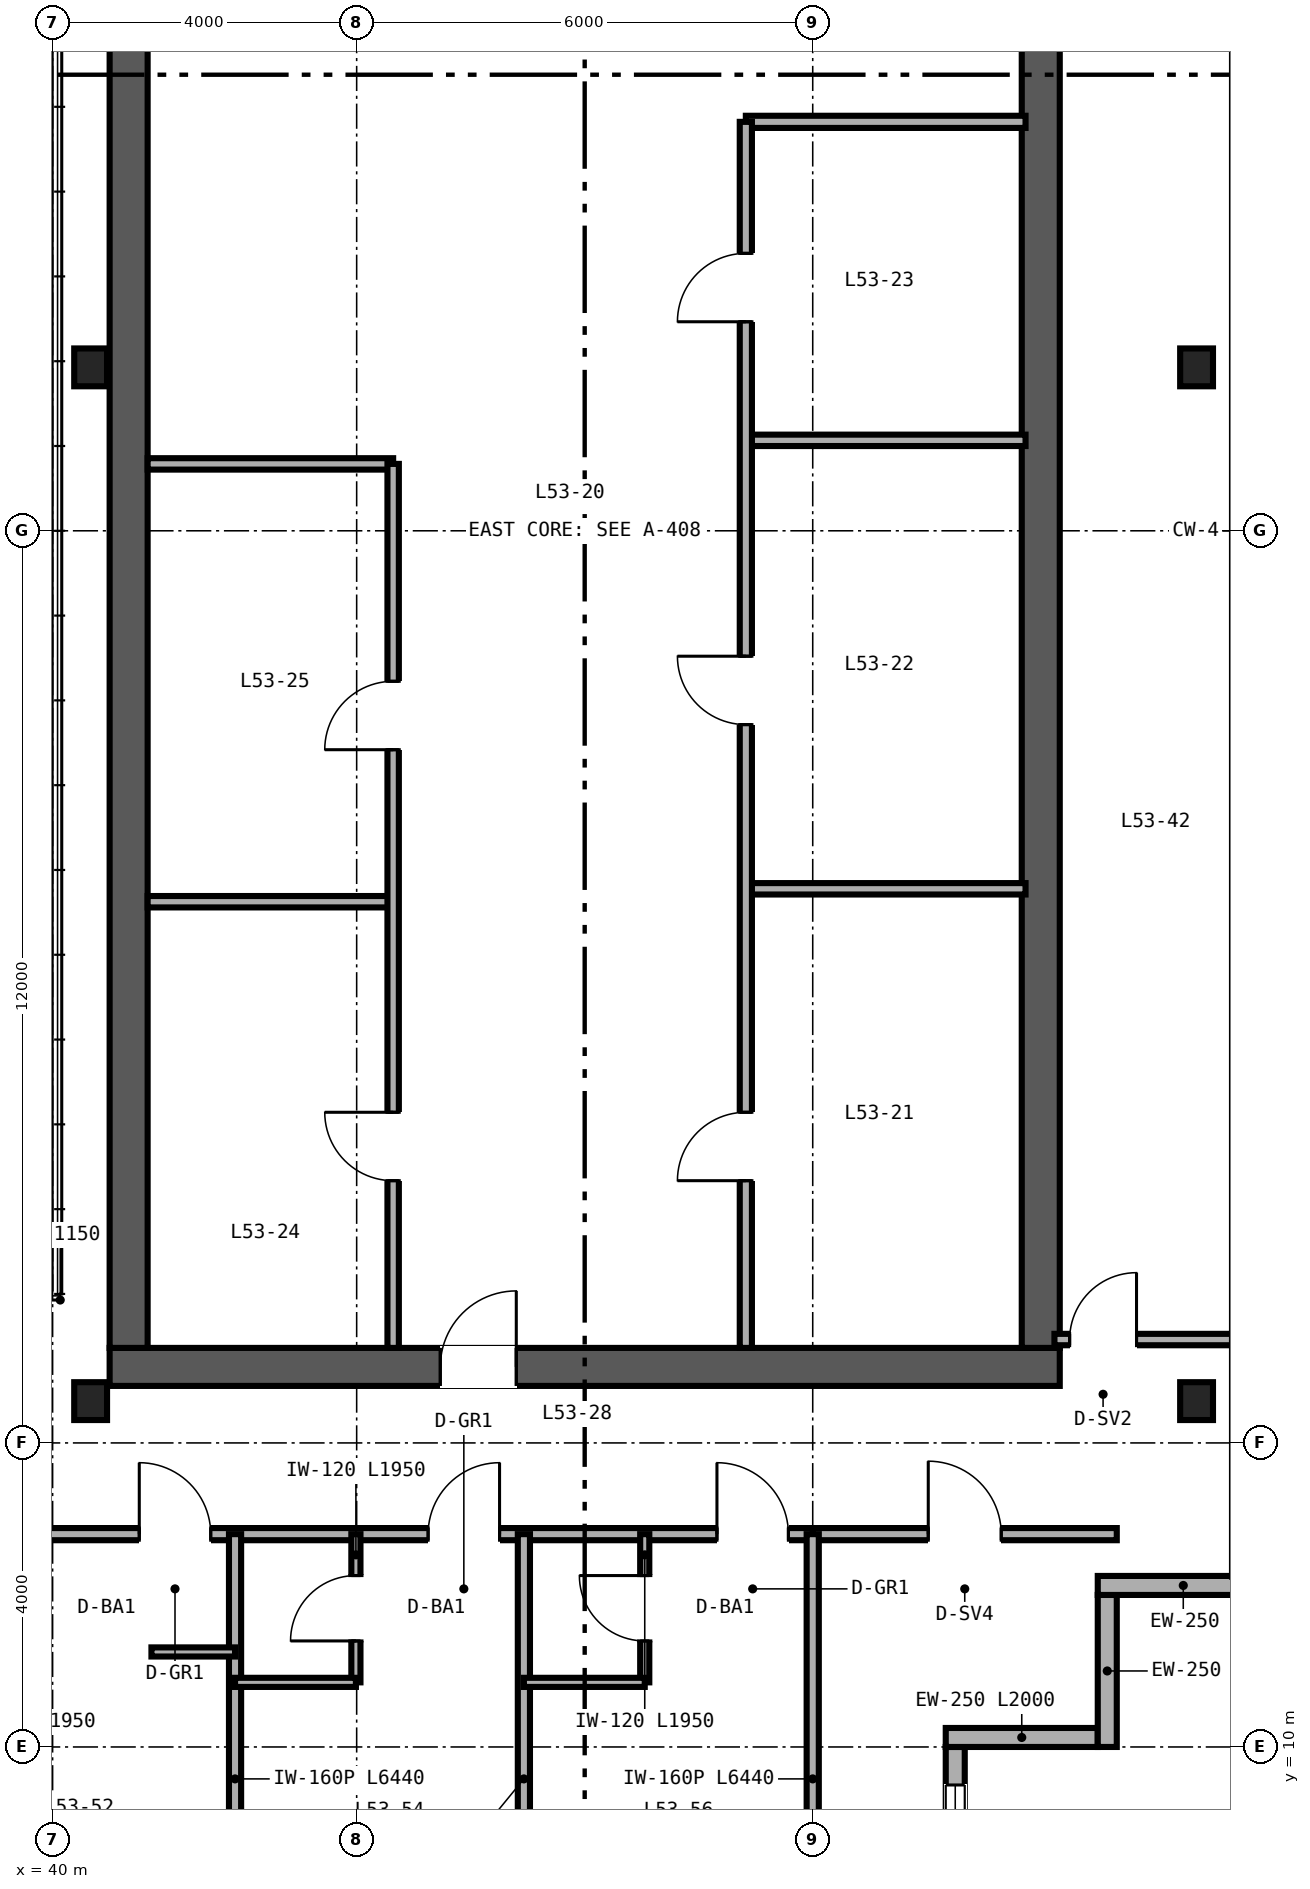
"""IFC4 building model, lengths in metres.
Left out: names, types, materials, properties, quantities, classifications, styles, units other than length and angle.
Written with IfcOpenShell. Run it as: python <this file> out.ifc"""

import sys

from ifc_helpers import new_model, si_unit, direction, frame, frame_2d, origin, origin_2d, place, context, subcontext, project, spatial, rectangle, i_section, extrude, source, transform, mapped, element, fill, save


model = new_model("IFC4")
c1 = context("Model", 3, precision=1e-05, world=origin(), true_north=direction((0.0, 1.0)))
c2 = subcontext(c1, "Body", "Model", "MODEL_VIEW")
j1 = project(units=[si_unit("LENGTHUNIT", "METRE"), si_unit("PLANEANGLEUNIT", "RADIAN")], contexts=[c1])
p1 = place(None, origin())
s1 = spatial("IfcSite", under=j1, at=p1, CompositionType="ELEMENT")
p2 = place(p1, origin())
s2 = spatial("IfcBuilding", under=s1, at=p2, CompositionType="ELEMENT")
p3 = place(p2, frame((0.0, 0.0, 210.0)))
s3 = spatial("IfcBuildingStorey", under=s2, at=p3, CompositionType="ELEMENT", Elevation=210.0)
p4 = place(p3, frame((40.75, 15.0, 0.0), z_axis=(0.0, 0.0, 1.0), x_axis=(1.0, 0.0, 0.0)))
e1 = element("IfcWall", 1, at=p4, inside=s3, PredefinedType="SHEAR", context=c2, shape_type="SweptSolid", body=[
    extrude(rectangle(XDim=12.5, YDim=0.5, at=frame_2d((6.25, 0.0))), origin(), (0.0, 0.0, 1.0), 3.37),
])
p5 = place(p4, frame((4.35, 0.0, 0.0)))
e2 = element("IfcOpeningElement", 2, at=p5, cuts=e1, PredefinedType="OPENING", context=c2, shape_type="SweptSolid", body=[
    extrude(rectangle(XDim=1.0, YDim=2.15, at=frame_2d((0.5, 1.075))), frame((0.0, 0.26, 0.0), z_axis=(0.0, -1.0, 0.0), x_axis=(1.0, 0.0, 0.0)), (0.0, 0.0, 1.0), 0.52),
])
for number, where, z_axis, x_axis in (
    (3, (41.0, 15.25, 0.0), (0.0, 0.0, 1.0), (0.0, 1.0, 0.0)),
    (4, (53.0, 15.25, 0.0), (0.0, 0.0, 1.0), (0.0, 1.0, 0.0)),
):
    element("IfcWall", number, at=place(p3, frame(where, z_axis=z_axis, x_axis=x_axis)), inside=s3, PredefinedType="SHEAR", context=c2, shape_type="SweptSolid", body=[
        extrude(rectangle(XDim=21.5, YDim=0.5, at=frame_2d((10.75, 0.0))), origin(), (0.0, 0.0, 1.0), 3.37),
    ])
m1 = source(origin(), c2, "Body", "SweptSolid", [
    extrude(i_section(OverallWidth=0.432, OverallDepth=0.498, WebThickness=0.056, FlangeThickness=0.089, FilletRadius=0.025, at=origin_2d()), origin(), (0.0, 0.0, 1.0), 3.37),
])
for number, where, z_axis, x_axis in (
    (5, (40.5, 14.55, 0.0), (0.0, 0.0, 1.0), (1.0, 0.0, 0.0)),
    (6, (55.05, 14.55, 0.0), (0.0, 0.0, 1.0), (1.0, 0.0, 0.0)),
    (7, (40.5, 28.15, 0.0), (0.0, 0.0, 1.0), (1.0, 0.0, 0.0)),
    (8, (55.05, 28.15, 0.0), (0.0, 0.0, 1.0), (1.0, 0.0, 0.0)),
):
    element("IfcColumn", number, at=place(p3, frame(where, z_axis=z_axis, x_axis=x_axis)), inside=s3, PredefinedType="COLUMN", context=c2, shape_type="MappedRepresentation", body=[
        mapped(m1, transform((0.0, 0.0, 0.0), scale=1.0)),
    ])
p6 = place(p3, frame((51.875, 8.0, 0.0), z_axis=(0.0, 0.0, 1.0), x_axis=(0.0, 1.0, 0.0)))
e9 = element("IfcWall", 9, at=p6, inside=s3, PredefinedType="SOLIDWALL", context=c2, shape_type="SweptSolid", body=[
    extrude(rectangle(XDim=2.0, YDim=0.25, at=frame_2d((1.0, 0.0))), origin(), (0.0, 0.0, 1.0), 3.37),
])
p7 = place(p6, frame((0.5, 0.0, 0.85)))
e10 = element("IfcOpeningElement", 10, at=p7, cuts=e9, PredefinedType="OPENING", context=c2, shape_type="SweptSolid", body=[
    extrude(rectangle(XDim=1.0, YDim=1.9, at=frame_2d((0.5, 0.95))), frame((0.0, 0.135, 0.0), z_axis=(0.0, -1.0, 0.0), x_axis=(1.0, 0.0, 0.0)), (0.0, 0.0, 1.0), 0.27),
])
for number, where, z_axis, x_axis in (
    (11, (51.75, 10.125, 0.0), (0.0, 0.0, 1.0), (1.0, 0.0, 0.0)),
    (12, (53.875, 10.0, 0.0), (0.0, 0.0, 1.0), (0.0, 1.0, 0.0)),
):
    element("IfcWall", number, at=place(p3, frame(where, z_axis=z_axis, x_axis=x_axis)), inside=s3, PredefinedType="SOLIDWALL", context=c2, shape_type="SweptSolid", body=[
        extrude(rectangle(XDim=2.0, YDim=0.25, at=frame_2d((1.0, 0.0))), origin(), (0.0, 0.0, 1.0), 3.37),
    ])
p8 = place(p3, frame((53.75, 12.125, 0.0), z_axis=(0.0, 0.0, 1.0), x_axis=(1.0, 0.0, 0.0)))
e13 = element("IfcWall", 13, at=p8, inside=s3, PredefinedType="SOLIDWALL", context=c2, shape_type="SweptSolid", body=[
    extrude(rectangle(XDim=2.25, YDim=0.25, at=frame_2d((1.125, 0.0))), origin(), (0.0, 0.0, 1.0), 3.37),
])
p9 = place(p3, frame((49.12, 31.38, 0.0), z_axis=(0.0, 0.0, 1.0), x_axis=(1.0, 0.0, 0.0)))
e14 = element("IfcWall", 14, at=p9, inside=s3, PredefinedType="PARTITIONING", context=c2, shape_type="SweptSolid", body=[
    extrude(rectangle(XDim=3.68, YDim=0.16, at=frame_2d((1.84, 0.0))), origin(), (0.0, 0.0, 1.0), 2.47),
])
for number, where, z_axis, x_axis in (
    (15, (49.12, 21.29, 0.0), (0.0, 0.0, 1.0), (1.0, 0.0, 0.0)),
    (16, (49.12, 27.19, 0.0), (0.0, 0.0, 1.0), (1.0, 0.0, 0.0)),
):
    element("IfcWall", number, at=place(p3, frame(where, z_axis=z_axis, x_axis=x_axis)), inside=s3, PredefinedType="PARTITIONING", context=c2, shape_type="SweptSolid", body=[
        extrude(rectangle(XDim=3.68, YDim=0.15, at=frame_2d((1.84, 0.0))), origin(), (0.0, 0.0, 1.0), 3.37),
    ])
p10 = place(p3, frame((49.12, 15.25, 0.0), z_axis=(0.0, 0.0, 1.0), x_axis=(0.0, 1.0, 0.0)))
e17 = element("IfcWall", 17, at=p10, inside=s3, PredefinedType="PARTITIONING", context=c2, shape_type="SweptSolid", body=[
    extrude(rectangle(XDim=16.13, YDim=0.16, at=frame_2d((8.065, 0.0))), origin(), (0.0, 0.0, 1.0), 2.443),
])
p11 = place(p10, frame((2.2, 0.0, 0.0)))
e18 = element("IfcOpeningElement", 18, at=p11, cuts=e17, PredefinedType="OPENING", context=c2, shape_type="SweptSolid", body=[
    extrude(rectangle(XDim=0.9, YDim=2.15, at=frame_2d((0.45, 1.075))), frame((0.0, 0.09, 0.0), z_axis=(0.0, -1.0, 0.0), x_axis=(1.0, 0.0, 0.0)), (0.0, 0.0, 1.0), 0.18),
])
p12 = place(p10, frame((8.2, 0.0, 0.0)))
e19 = element("IfcOpeningElement", 19, at=p12, cuts=e17, PredefinedType="OPENING", context=c2, shape_type="SweptSolid", body=[
    extrude(rectangle(XDim=0.9, YDim=2.15, at=frame_2d((0.45, 1.075))), frame((0.0, 0.09, 0.0), z_axis=(0.0, -1.0, 0.0), x_axis=(1.0, 0.0, 0.0)), (0.0, 0.0, 1.0), 0.18),
])
p13 = place(p10, frame((13.5, 0.0, 0.0)))
e20 = element("IfcOpeningElement", 20, at=p13, cuts=e17, PredefinedType="OPENING", context=c2, shape_type="SweptSolid", body=[
    extrude(rectangle(XDim=0.9, YDim=2.15, at=frame_2d((0.45, 1.075))), frame((0.0, 0.09, 0.0), z_axis=(0.0, -1.0, 0.0), x_axis=(1.0, 0.0, 0.0)), (0.0, 0.0, 1.0), 0.18),
])
for number, where, z_axis, x_axis in (
    (21, (41.25, 26.88, 0.0), (0.0, 0.0, 1.0), (1.0, 0.0, 0.0)),
    (22, (41.25, 21.12, 0.0), (0.0, 0.0, 1.0), (1.0, 0.0, 0.0)),
):
    element("IfcWall", number, at=place(p3, frame(where, z_axis=z_axis, x_axis=x_axis)), inside=s3, PredefinedType="PARTITIONING", context=c2, shape_type="SweptSolid", body=[
        extrude(rectangle(XDim=3.23, YDim=0.15, at=frame_2d((1.615, 0.0))), origin(), (0.0, 0.0, 1.0), 3.37),
    ])
p14 = place(p3, frame((44.48, 15.25, 0.0), z_axis=(0.0, 0.0, 1.0), x_axis=(0.0, 1.0, 0.0)))
e23 = element("IfcWall", 23, at=p14, inside=s3, PredefinedType="PARTITIONING", context=c2, shape_type="SweptSolid", body=[
    extrude(rectangle(XDim=11.63, YDim=0.15, at=frame_2d((5.815, 0.0))), origin(), (0.0, 0.0, 1.0), 3.37),
])
p15 = place(p14, frame((2.2, 0.0, 0.0)))
e24 = element("IfcOpeningElement", 24, at=p15, cuts=e23, PredefinedType="OPENING", context=c2, shape_type="SweptSolid", body=[
    extrude(rectangle(XDim=0.9, YDim=2.15, at=frame_2d((0.45, 1.075))), frame((0.0, 0.085, 0.0), z_axis=(0.0, -1.0, 0.0), x_axis=(1.0, 0.0, 0.0)), (0.0, 0.0, 1.0), 0.17),
])
p16 = place(p14, frame((7.87, 0.0, 0.0)))
e25 = element("IfcOpeningElement", 25, at=p16, cuts=e23, PredefinedType="OPENING", context=c2, shape_type="SweptSolid", body=[
    extrude(rectangle(XDim=0.9, YDim=2.15, at=frame_2d((0.45, 1.075))), frame((0.0, 0.085, 0.0), z_axis=(0.0, -1.0, 0.0), x_axis=(1.0, 0.0, 0.0)), (0.0, 0.0, 1.0), 0.17),
])
p17 = place(p3, frame((53.18, 15.36, 0.0), z_axis=(0.0, 0.0, 1.0), x_axis=(1.0, 0.0, 0.0)))
e26 = element("IfcWall", 26, at=p17, inside=s3, PredefinedType="PARTITIONING", context=c2, shape_type="SweptSolid", body=[
    extrude(rectangle(XDim=2.66, YDim=0.15, at=frame_2d((1.33, 0.0))), origin(), (0.0, 0.0, 1.0), 2.591),
])
p18 = place(p17, frame((0.2, 0.0, 0.0)))
e27 = element("IfcOpeningElement", 27, at=p18, cuts=e26, PredefinedType="OPENING", context=c2, shape_type="SweptSolid", body=[
    extrude(rectangle(XDim=0.88, YDim=2.15, at=frame_2d((0.44, 1.075))), frame((0.0, 0.085, 0.0), z_axis=(0.0, -1.0, 0.0), x_axis=(1.0, 0.0, 0.0)), (0.0, 0.0, 1.0), 0.17),
])
p19 = place(p3, frame((50.0, 12.8, 0.0), z_axis=(0.0, 0.0, 1.0), x_axis=(1.0, 0.0, 0.0)))
e28 = element("IfcWall", 28, at=p19, inside=s3, PredefinedType="PARTITIONING", context=c2, shape_type="SweptSolid", body=[
    extrude(rectangle(XDim=4.0, YDim=0.16, at=frame_2d((2.0, 0.0))), origin(), (0.0, 0.0, 1.0), 3.37),
])
p20 = place(p19, frame((1.52, 0.0, 0.0)))
e29 = element("IfcOpeningElement", 29, at=p20, cuts=e28, PredefinedType="OPENING", context=c2, shape_type="SweptSolid", body=[
    extrude(rectangle(XDim=0.96, YDim=2.15, at=frame_2d((0.48, 1.075))), frame((0.0, 0.09, 0.0), z_axis=(0.0, -1.0, 0.0), x_axis=(1.0, 0.0, 0.0)), (0.0, 0.0, 1.0), 0.18),
])
p21 = place(p3, frame((38.0, 12.8, 0.0), z_axis=(0.0, 0.0, 1.0), x_axis=(1.0, 0.0, 0.0)))
e30 = element("IfcWall", 30, at=p21, inside=s3, PredefinedType="PARTITIONING", context=c2, shape_type="SweptSolid", body=[
    extrude(rectangle(XDim=12.0, YDim=0.16, at=frame_2d((6.0, 0.0))), origin(), (0.0, 0.0, 1.0), 2.913),
])
p22 = place(p21, frame((3.14, 0.0, 0.0)))
e31 = element("IfcOpeningElement", 31, at=p22, cuts=e30, PredefinedType="OPENING", context=c2, shape_type="SweptSolid", body=[
    extrude(rectangle(XDim=0.94, YDim=2.15, at=frame_2d((0.47, 1.075))), frame((0.0, 0.09, 0.0), z_axis=(0.0, -1.0, 0.0), x_axis=(1.0, 0.0, 0.0)), (0.0, 0.0, 1.0), 0.18),
])
p23 = place(p21, frame((6.94, 0.0, 0.0)))
e32 = element("IfcOpeningElement", 32, at=p23, cuts=e30, PredefinedType="OPENING", context=c2, shape_type="SweptSolid", body=[
    extrude(rectangle(XDim=0.94, YDim=2.15, at=frame_2d((0.47, 1.075))), frame((0.0, 0.09, 0.0), z_axis=(0.0, -1.0, 0.0), x_axis=(1.0, 0.0, 0.0)), (0.0, 0.0, 1.0), 0.18),
])
p24 = place(p21, frame((10.74, 0.0, 0.0)))
e33 = element("IfcOpeningElement", 33, at=p24, cuts=e30, PredefinedType="OPENING", context=c2, shape_type="SweptSolid", body=[
    extrude(rectangle(XDim=0.94, YDim=2.15, at=frame_2d((0.47, 1.075))), frame((0.0, 0.09, 0.0), z_axis=(0.0, -1.0, 0.0), x_axis=(1.0, 0.0, 0.0)), (0.0, 0.0, 1.0), 0.18),
])
p25 = place(p3, frame((50.0, 6.36, 0.0), z_axis=(0.0, 0.0, 1.0), x_axis=(0.0, 1.0, 0.0)))
e34 = element("IfcWall", 34, at=p25, inside=s3, PredefinedType="PARTITIONING", context=c2, shape_type="SweptSolid", body=[
    extrude(rectangle(XDim=6.44, YDim=0.16, at=frame_2d((3.22, 0.0))), origin(), (0.0, 0.0, 1.0), 2.677),
])
p26 = place(p3, frame((42.4, 6.36, 0.0), z_axis=(0.0, 0.0, 1.0), x_axis=(0.0, 1.0, 0.0)))
e35 = element("IfcWall", 35, at=p26, inside=s3, PredefinedType="PARTITIONING", context=c2, shape_type="SweptSolid", body=[
    extrude(rectangle(XDim=6.44, YDim=0.16, at=frame_2d((3.22, 0.0))), origin(), (0.0, 0.0, 1.0), 2.833),
])
p27 = place(p3, frame((41.3, 11.25, 0.0), z_axis=(0.0, 0.0, 1.0), x_axis=(1.0, 0.0, 0.0)))
e36 = element("IfcWall", 36, at=p27, inside=s3, PredefinedType="PARTITIONING", context=c2, shape_type="SweptSolid", body=[
    extrude(rectangle(XDim=1.1, YDim=0.12, at=frame_2d((0.55, 0.0))), origin(), (0.0, 0.0, 1.0), 3.37),
])
p28 = place(p3, frame((46.2, 6.36, 0.0), z_axis=(0.0, 0.0, 1.0), x_axis=(0.0, 1.0, 0.0)))
e37 = element("IfcWall", 37, at=p28, inside=s3, PredefinedType="PARTITIONING", context=c2, shape_type="SweptSolid", body=[
    extrude(rectangle(XDim=6.44, YDim=0.16, at=frame_2d((3.22, 0.0))), origin(), (0.0, 0.0, 1.0), 2.677),
])
p29 = place(p3, frame((43.99, 10.85, 0.0), z_axis=(0.0, 0.0, 1.0), x_axis=(0.0, 1.0, 0.0)))
e38 = element("IfcWall", 38, at=p29, inside=s3, PredefinedType="PARTITIONING", context=c2, shape_type="SweptSolid", body=[
    extrude(rectangle(XDim=1.95, YDim=0.12, at=frame_2d((0.975, 0.0))), origin(), (0.0, 0.0, 1.0), 3.37),
])
p30 = place(p29, frame((0.545, 0.0, 0.0)))
e39 = element("IfcOpeningElement", 39, at=p30, cuts=e38, PredefinedType="OPENING", context=c2, shape_type="SweptSolid", body=[
    extrude(rectangle(XDim=0.86, YDim=2.1, at=frame_2d((0.43, 1.05))), frame((0.0, 0.07, 0.0), z_axis=(0.0, -1.0, 0.0), x_axis=(1.0, 0.0, 0.0)), (0.0, 0.0, 1.0), 0.14),
])
p31 = place(p3, frame((42.4, 10.85, 0.0), z_axis=(0.0, 0.0, 1.0), x_axis=(1.0, 0.0, 0.0)))
e40 = element("IfcWall", 40, at=p31, inside=s3, PredefinedType="PARTITIONING", context=c2, shape_type="SweptSolid", body=[
    extrude(rectangle(XDim=1.59, YDim=0.12, at=frame_2d((0.795, 0.0))), origin(), (0.0, 0.0, 1.0), 3.37),
])
p32 = place(p3, frame((47.79, 10.85, 0.0), z_axis=(0.0, 0.0, 1.0), x_axis=(0.0, 1.0, 0.0)))
e41 = element("IfcWall", 41, at=p32, inside=s3, PredefinedType="PARTITIONING", context=c2, shape_type="SweptSolid", body=[
    extrude(rectangle(XDim=1.95, YDim=0.12, at=frame_2d((0.975, 0.0))), origin(), (0.0, 0.0, 1.0), 3.37),
])
p33 = place(p32, frame((0.545, 0.0, 0.0)))
e42 = element("IfcOpeningElement", 42, at=p33, cuts=e41, PredefinedType="OPENING", context=c2, shape_type="SweptSolid", body=[
    extrude(rectangle(XDim=0.86, YDim=2.1, at=frame_2d((0.43, 1.05))), frame((0.0, 0.07, 0.0), z_axis=(0.0, -1.0, 0.0), x_axis=(1.0, 0.0, 0.0)), (0.0, 0.0, 1.0), 0.14),
])
p34 = place(p3, frame((46.2, 10.85, 0.0), z_axis=(0.0, 0.0, 1.0), x_axis=(1.0, 0.0, 0.0)))
e43 = element("IfcWall", 43, at=p34, inside=s3, PredefinedType="PARTITIONING", context=c2, shape_type="SweptSolid", body=[
    extrude(rectangle(XDim=1.59, YDim=0.12, at=frame_2d((0.795, 0.0))), origin(), (0.0, 0.0, 1.0), 3.37),
])
m2 = source(origin(), c2, "Body", "SweptSolid", [
    extrude(rectangle(XDim=1.0, YDim=1.9, at=frame_2d((0.5, 0.95))), frame((0.0, 0.03, 0.0), z_axis=(0.0, -1.0, 0.0), x_axis=(1.0, 0.0, 0.0)), (0.0, 0.0, 1.0), 0.06),
])
p35 = place(p7, origin())
e44 = element("IfcWindow", 44, at=p35, inside=s3, PartitioningType="SINGLE_PANEL", PredefinedType="WINDOW", context=c2, shape_type="MappedRepresentation", body=[
    mapped(m2, transform((0.0, 0.0, 0.0), scale=1.0)),
])
fill(e10, e44)
m3 = source(origin(), c2, "Body", "SweptSolid", [
    extrude(rectangle(XDim=1.0, YDim=2.15, at=frame_2d((0.5, 1.075))), frame((0.0, 0.025, 0.0), z_axis=(0.0, -1.0, 0.0), x_axis=(1.0, 0.0, 0.0)), (0.0, 0.0, 1.0), 0.05),
])
p36 = place(p5, origin())
e45 = element("IfcDoor", 45, at=p36, inside=s3, OperationType="SINGLE_SWING_RIGHT", PredefinedType="DOOR", context=c2, shape_type="MappedRepresentation", body=[
    mapped(m3, transform((0.0, 0.0, 0.0), scale=1.0)),
])
fill(e2, e45)
m4 = source(origin(), c2, "Body", "SweptSolid", [
    extrude(rectangle(XDim=0.9, YDim=2.15, at=frame_2d((0.45, 1.075))), frame((0.0, 0.025, 0.0), z_axis=(0.0, -1.0, 0.0), x_axis=(1.0, 0.0, 0.0)), (0.0, 0.0, 1.0), 0.05),
])
p37 = place(p11, origin())
e46 = element("IfcDoor", 46, at=p37, inside=s3, OperationType="SINGLE_SWING_LEFT", PredefinedType="DOOR", context=c2, shape_type="MappedRepresentation", body=[
    mapped(m4, transform((0.0, 0.0, 0.0), scale=1.0)),
])
fill(e18, e46)
p38 = place(p12, origin())
e47 = element("IfcDoor", 47, at=p38, inside=s3, OperationType="SINGLE_SWING_RIGHT", PredefinedType="DOOR", context=c2, shape_type="MappedRepresentation", body=[
    mapped(m4, transform((0.0, 0.0, 0.0), scale=1.0)),
])
fill(e19, e47)
p39 = place(p13, origin())
e48 = element("IfcDoor", 48, at=p39, inside=s3, OperationType="SINGLE_SWING_LEFT", PredefinedType="DOOR", context=c2, shape_type="MappedRepresentation", body=[
    mapped(m4, transform((0.0, 0.0, 0.0), scale=1.0)),
])
fill(e20, e48)
p40 = place(p15, origin())
e49 = element("IfcDoor", 49, at=p40, inside=s3, OperationType="SINGLE_SWING_RIGHT", PredefinedType="DOOR", context=c2, shape_type="MappedRepresentation", body=[
    mapped(m4, transform((0.0, 0.0, 0.0), scale=1.0)),
])
fill(e24, e49)
p41 = place(p16, origin())
e50 = element("IfcDoor", 50, at=p41, inside=s3, OperationType="SINGLE_SWING_LEFT", PredefinedType="DOOR", context=c2, shape_type="MappedRepresentation", body=[
    mapped(m4, transform((0.0, 0.0, 0.0), scale=1.0)),
])
fill(e25, e50)
m5 = source(origin(), c2, "Body", "SweptSolid", [
    extrude(rectangle(XDim=0.88, YDim=2.15, at=frame_2d((0.44, 1.075))), frame((0.0, 0.025, 0.0), z_axis=(0.0, -1.0, 0.0), x_axis=(1.0, 0.0, 0.0)), (0.0, 0.0, 1.0), 0.05),
])
p42 = place(p18, origin())
e51 = element("IfcDoor", 51, at=p42, inside=s3, OperationType="SINGLE_SWING_RIGHT", PredefinedType="DOOR", context=c2, shape_type="MappedRepresentation", body=[
    mapped(m5, transform((0.0, 0.0, 0.0), scale=1.0)),
])
fill(e27, e51)
m6 = source(origin(), c2, "Body", "SweptSolid", [
    extrude(rectangle(XDim=0.96, YDim=2.15, at=frame_2d((0.48, 1.075))), frame((0.0, 0.025, 0.0), z_axis=(0.0, -1.0, 0.0), x_axis=(1.0, 0.0, 0.0)), (0.0, 0.0, 1.0), 0.05),
])
p43 = place(p20, origin())
e52 = element("IfcDoor", 52, at=p43, inside=s3, OperationType="SINGLE_SWING_LEFT", PredefinedType="DOOR", context=c2, shape_type="MappedRepresentation", body=[
    mapped(m6, transform((0.0, 0.0, 0.0), scale=1.0)),
])
fill(e29, e52)
m7 = source(origin(), c2, "Body", "SweptSolid", [
    extrude(rectangle(XDim=0.86, YDim=2.1, at=frame_2d((0.43, 1.05))), frame((0.0, 0.025, 0.0), z_axis=(0.0, -1.0, 0.0), x_axis=(1.0, 0.0, 0.0)), (0.0, 0.0, 1.0), 0.05),
])
p44 = place(p30, origin())
e53 = element("IfcDoor", 53, at=p44, inside=s3, OperationType="SINGLE_SWING_LEFT", PredefinedType="DOOR", context=c2, shape_type="MappedRepresentation", body=[
    mapped(m7, transform((0.0, 0.0, 0.0), scale=1.0)),
])
fill(e39, e53)
p45 = place(p33, origin())
e54 = element("IfcDoor", 54, at=p45, inside=s3, OperationType="SINGLE_SWING_RIGHT", PredefinedType="DOOR", context=c2, shape_type="MappedRepresentation", body=[
    mapped(m7, transform((0.0, 0.0, 0.0), scale=1.0)),
])
fill(e42, e54)
m8 = source(origin(), c2, "Body", "SweptSolid", [
    extrude(rectangle(XDim=0.94, YDim=2.15, at=frame_2d((0.47, 1.075))), frame((0.0, 0.025, 0.0), z_axis=(0.0, -1.0, 0.0), x_axis=(1.0, 0.0, 0.0)), (0.0, 0.0, 1.0), 0.05),
])
p46 = place(p22, origin())
e55 = element("IfcDoor", 55, at=p46, inside=s3, OperationType="SINGLE_SWING_LEFT", PredefinedType="DOOR", context=c2, shape_type="MappedRepresentation", body=[
    mapped(m8, transform((0.0, 0.0, 0.0), scale=1.0)),
])
fill(e31, e55)
p47 = place(p23, origin())
e56 = element("IfcDoor", 56, at=p47, inside=s3, OperationType="SINGLE_SWING_RIGHT", PredefinedType="DOOR", context=c2, shape_type="MappedRepresentation", body=[
    mapped(m8, transform((0.0, 0.0, 0.0), scale=1.0)),
])
fill(e32, e56)
p48 = place(p24, origin())
e57 = element("IfcDoor", 57, at=p48, inside=s3, OperationType="SINGLE_SWING_LEFT", PredefinedType="DOOR", context=c2, shape_type="MappedRepresentation", body=[
    mapped(m8, transform((0.0, 0.0, 0.0), scale=1.0)),
])
fill(e33, e57)
save(model, sys.argv[1])
